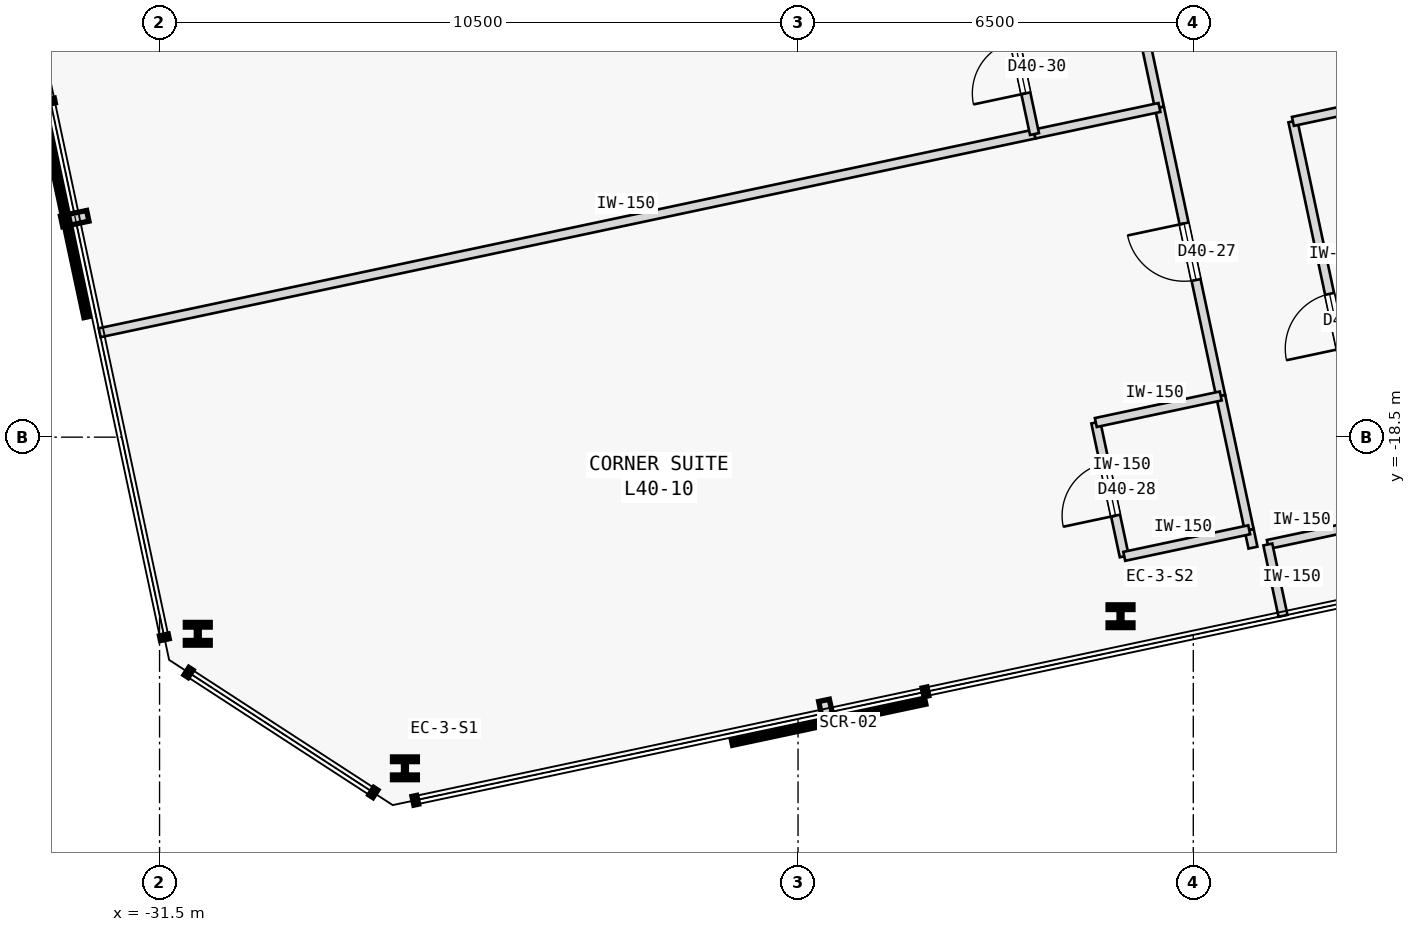
"""IFC4 building model, lengths in metres.
Left out: names, types, materials, properties, quantities, classifications, styles, units other than length and angle.
Written with IfcOpenShell. Run it as: python <this file> out.ifc"""

import sys

from ifc_helpers import new_model, si_unit, direction, frame, frame_2d, origin, origin_2d, place, context, subcontext, project, spatial, rectangle, i_section, extrude, element, fill, save


model = new_model("IFC4")
c1 = context("Model", 3, precision=1e-05, world=origin(), true_north=direction((0.0, 1.0)))
c2 = subcontext(c1, "Body", "Model", "MODEL_VIEW")
j1 = project(units=[si_unit("LENGTHUNIT", "METRE"), si_unit("PLANEANGLEUNIT", "RADIAN")], contexts=[c1])
p1 = place(None, origin())
s1 = spatial("IfcSite", under=j1, at=p1, CompositionType="ELEMENT")
p2 = place(p1, origin())
s2 = spatial("IfcBuilding", under=s1, at=p2, CompositionType="ELEMENT")
p3 = place(p2, frame((0.0, 0.0, 158.2)))
s3 = spatial("IfcBuildingStorey", under=s2, at=p3, CompositionType="ELEMENT", Elevation=158.2)
for number, where, z_axis, x_axis in (
    (1, (-27.465, -23.946, 0.0), (0.0, 0.0, 1.0), (1.0, 0.0, 0.0)),
    (2, (-15.697, -21.444, 0.0), (0.0, 0.0, 1.0), (1.0, 0.0, 0.0)),
    (3, (-30.871, -21.733, 0.0), (0.0, 0.0, 1.0), (1.0, 0.0, 0.0)),
):
    element("IfcColumn", number, at=place(p3, frame(where, z_axis=z_axis, x_axis=x_axis)), inside=s3, PredefinedType="COLUMN", context=c2, shape_type="SweptSolid", body=[
        extrude(i_section(OverallWidth=0.409, OverallDepth=0.374, WebThickness=0.048, FlangeThickness=0.077, FilletRadius=0.015, at=origin_2d()), origin(), (0.0, 0.0, 1.0), 3.4),
    ])
p4 = place(p3, frame((-13.274, -20.265, 0.0), z_axis=(0.0, 0.0, 1.0), x_axis=(0.978160192495, 0.207852442415, 0.0)))
e4 = element("IfcWall", 4, at=p4, inside=s3, PredefinedType="PARTITIONING", context=c2, shape_type="SweptSolid", body=[
    extrude(rectangle(XDim=1.85, YDim=0.15, at=frame_2d((0.925, 0.0))), origin(), (0.0, 0.0, 1.0), 3.175),
])
p5 = place(p3, frame((-11.465, -19.88, 0.0), z_axis=(0.0, 0.0, 1.0), x_axis=(-0.207916109912, 0.978146661416, 0.0)))
e5 = element("IfcWall", 5, at=p5, inside=s3, PredefinedType="PARTITIONING", context=c2, shape_type="SweptSolid", body=[
    extrude(rectangle(XDim=6.72, YDim=0.15, at=frame_2d((3.36, 0.0))), origin(), (0.0, 0.0, 1.0), 3.175),
])
p6 = place(p5, frame((2.9, 0.0, 0.0)))
e6 = element("IfcOpeningElement", 6, at=p6, cuts=e5, PredefinedType="OPENING", context=c2, shape_type="SweptSolid", body=[
    extrude(rectangle(XDim=0.92, YDim=2.15, at=frame_2d((0.46, 1.075))), frame((0.0, 0.085, 0.0), z_axis=(0.0, -1.0, 0.0), x_axis=(1.0, 0.0, 0.0)), (0.0, 0.0, 1.0), 0.17),
])
p7 = place(p3, frame((-12.862, -13.307, 0.0), z_axis=(0.0, 0.0, 1.0), x_axis=(0.978145647498, 0.207920879857, 0.0)))
e7 = element("IfcWall", 7, at=p7, inside=s3, PredefinedType="PARTITIONING", context=c2, shape_type="SweptSolid", body=[
    extrude(rectangle(XDim=5.029, YDim=0.15, at=frame_2d((2.515, 0.0))), origin(), (0.0, 0.0, 1.0), 3.175),
])
p8 = place(p3, frame((-13.519, -20.317, 0.0), z_axis=(0.0, 0.0, 1.0), x_axis=(-0.207527808066, 0.978229118806, 0.0)))
e8 = element("IfcWall", 8, at=p8, inside=s3, PredefinedType="PARTITIONING", context=c2, shape_type="SweptSolid", body=[
    extrude(rectangle(XDim=0.3, YDim=0.15, at=frame_2d((0.15, 0.0))), origin(), (0.0, 0.0, 1.0), 3.175),
])
p9 = place(p3, frame((-14.049, -17.823, 0.0), z_axis=(0.0, 0.0, 1.0), x_axis=(-0.2079027059, 0.978149510494, 0.0)))
e9 = element("IfcWall", 9, at=p9, inside=s3, PredefinedType="PARTITIONING", context=c2, shape_type="SweptSolid", body=[
    extrude(rectangle(XDim=4.85, YDim=0.15, at=frame_2d((2.425, 0.0))), origin(), (0.0, 0.0, 1.0), 3.175),
])
p10 = place(p9, frame((1.95, 0.0, 0.0)))
e10 = element("IfcOpeningElement", 10, at=p10, cuts=e9, PredefinedType="OPENING", context=c2, shape_type="SweptSolid", body=[
    extrude(rectangle(XDim=0.95, YDim=2.15, at=frame_2d((0.475, 1.075))), frame((0.0, 0.085, 0.0), z_axis=(0.0, -1.0, 0.0), x_axis=(1.0, 0.0, 0.0)), (0.0, 0.0, 1.0), 0.17),
])
p11 = place(p3, frame((-13.581, -20.023, 0.0), z_axis=(0.0, 0.0, 1.0), x_axis=(-0.207891197838, 0.978151956427, 0.0)))
e11 = element("IfcWall", 11, at=p11, inside=s3, PredefinedType="PARTITIONING", context=c2, shape_type="SweptSolid", body=[
    extrude(rectangle(XDim=2.25, YDim=0.15, at=frame_2d((1.125, 0.0))), origin(), (0.0, 0.0, 1.0), 3.175),
])
p12 = place(p3, frame((-15.057, -13.079, 0.0), z_axis=(0.0, 0.0, 1.0), x_axis=(-0.207995007687, 0.978129887478, 0.0)))
e12 = element("IfcWall", 12, at=p12, inside=s3, PredefinedType="PARTITIONING", context=c2, shape_type="SweptSolid", body=[
    extrude(rectangle(XDim=2.25, YDim=0.15, at=frame_2d((1.125, 0.0))), origin(), (0.0, 0.0, 1.0), 3.175),
])
p13 = place(p3, frame((-13.025, -21.439, 0.0), z_axis=(0.0, 0.0, 1.0), x_axis=(-0.207917150959, 0.978146440129, 0.0)))
e13 = element("IfcWall", 13, at=p13, inside=s3, PredefinedType="PARTITIONING", context=c2, shape_type="SweptSolid", body=[
    extrude(rectangle(XDim=1.2, YDim=0.15, at=frame_2d((0.6, 0.0))), origin(), (0.0, 0.0, 1.0), 3.175),
])
p14 = place(p3, frame((-15.635, -20.46, 0.0), z_axis=(0.0, 0.0, 1.0), x_axis=(-0.207913264065, 0.978147266328, 0.0)))
e14 = element("IfcWall", 14, at=p14, inside=s3, PredefinedType="PARTITIONING", context=c2, shape_type="SweptSolid", body=[
    extrude(rectangle(XDim=2.25, YDim=0.15, at=frame_2d((1.125, 0.0))), origin(), (0.0, 0.0, 1.0), 3.175),
])
p15 = place(p14, frame((0.685, 0.0, 0.0)))
e15 = element("IfcOpeningElement", 15, at=p15, cuts=e14, PredefinedType="OPENING", context=c2, shape_type="SweptSolid", body=[
    extrude(rectangle(XDim=0.88, YDim=2.15, at=frame_2d((0.44, 1.075))), frame((0.0, 0.085, 0.0), z_axis=(0.0, -1.0, 0.0), x_axis=(1.0, 0.0, 0.0)), (0.0, 0.0, 1.0), 0.17),
])
for number, where, z_axis, x_axis in (
    (16, (-15.635, -20.46, 0.0), (0.0, 0.0, 1.0), (0.978, 0.208, 0.0)),
    (17, (-16.103, -18.259, 0.0), (0.0, 0.0, 1.0), (0.978, 0.208, 0.0)),
):
    element("IfcWall", number, at=place(p3, frame(where, z_axis=z_axis, x_axis=x_axis)), inside=s3, PredefinedType="PARTITIONING", context=c2, shape_type="SweptSolid", body=[
        extrude(rectangle(XDim=2.1, YDim=0.15, at=frame_2d((1.05, 0.0))), origin(), (0.0, 0.0, 1.0), 3.175),
    ])
p16 = place(p3, frame((-32.486, -16.783, 0.0), z_axis=(0.0, 0.0, 1.0), x_axis=(0.978146137903, 0.207918572776, 0.0)))
e18 = element("IfcWall", 18, at=p16, inside=s3, PredefinedType="PARTITIONING", context=c2, shape_type="SweptSolid", body=[
    extrude(rectangle(XDim=15.718, YDim=0.15, at=frame_2d((7.859, 0.0))), origin(), (0.0, 0.0, 1.0), 3.175),
])
p17 = place(p3, frame((-17.111, -13.515, 0.0), z_axis=(0.0, 0.0, 1.0), x_axis=(0.97815826, 0.207861536591, 0.0)))
e19 = element("IfcWall", 19, at=p17, inside=s3, PredefinedType="PARTITIONING", context=c2, shape_type="SweptSolid", body=[
    extrude(rectangle(XDim=2.1, YDim=0.15, at=frame_2d((1.05, 0.0))), origin(), (0.0, 0.0, 1.0), 3.175),
])
p18 = place(p3, frame((-17.111, -13.515, 0.0), z_axis=(0.0, 0.0, 1.0), x_axis=(-0.207913264065, 0.978147266328, 0.0)))
e20 = element("IfcWall", 20, at=p18, inside=s3, PredefinedType="PARTITIONING", context=c2, shape_type="SweptSolid", body=[
    extrude(rectangle(XDim=2.25, YDim=0.15, at=frame_2d((1.125, 0.0))), origin(), (0.0, 0.0, 1.0), 3.175),
])
p19 = place(p18, frame((0.685, 0.0, 0.0)))
e21 = element("IfcOpeningElement", 21, at=p19, cuts=e20, PredefinedType="OPENING", context=c2, shape_type="SweptSolid", body=[
    extrude(rectangle(XDim=0.88, YDim=2.15, at=frame_2d((0.44, 1.075))), frame((0.0, 0.085, 0.0), z_axis=(0.0, -1.0, 0.0), x_axis=(1.0, 0.0, 0.0)), (0.0, 0.0, 1.0), 0.17),
])
p20 = place(p6, origin())
e22 = element("IfcDoor", 22, at=p20, inside=s3, OperationType="SINGLE_SWING_LEFT", PredefinedType="DOOR", context=c2, shape_type="SweptSolid", body=[
    extrude(rectangle(XDim=0.92, YDim=2.15, at=frame_2d((0.46, 1.075))), frame((0.0, 0.025, 0.0), z_axis=(0.0, -1.0, 0.0), x_axis=(1.0, 0.0, 0.0)), (0.0, 0.0, 1.0), 0.05),
])
fill(e6, e22)
p21 = place(p10, origin())
e23 = element("IfcDoor", 23, at=p21, inside=s3, OperationType="SINGLE_SWING_RIGHT", PredefinedType="DOOR", context=c2, shape_type="SweptSolid", body=[
    extrude(rectangle(XDim=0.95, YDim=2.15, at=frame_2d((0.475, 1.075))), frame((0.0, 0.025, 0.0), z_axis=(0.0, -1.0, 0.0), x_axis=(1.0, 0.0, 0.0)), (0.0, 0.0, 1.0), 0.05),
])
fill(e10, e23)
p22 = place(p15, origin())
e24 = element("IfcDoor", 24, at=p22, inside=s3, OperationType="SINGLE_SWING_LEFT", PredefinedType="DOOR", context=c2, shape_type="SweptSolid", body=[
    extrude(rectangle(XDim=0.88, YDim=2.15, at=frame_2d((0.44, 1.075))), frame((0.0, 0.025, 0.0), z_axis=(0.0, -1.0, 0.0), x_axis=(1.0, 0.0, 0.0)), (0.0, 0.0, 1.0), 0.05),
])
fill(e15, e24)
p23 = place(p19, origin())
e25 = element("IfcDoor", 25, at=p23, inside=s3, OperationType="SINGLE_SWING_LEFT", PredefinedType="DOOR", context=c2, shape_type="SweptSolid", body=[
    extrude(rectangle(XDim=0.88, YDim=2.15, at=frame_2d((0.44, 1.075))), frame((0.0, 0.025, 0.0), z_axis=(0.0, -1.0, 0.0), x_axis=(1.0, 0.0, 0.0)), (0.0, 0.0, 1.0), 0.05),
])
fill(e21, e25)
save(model, sys.argv[1])
